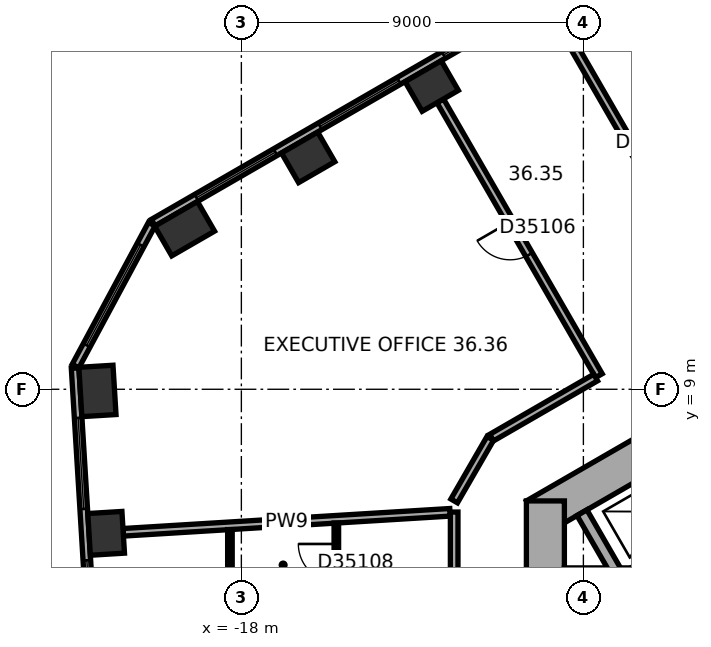
"""IFC4 building model, lengths in metres.
Left out: names, types, materials, properties, quantities, classifications, styles, units other than length and angle.
Written with IfcOpenShell. Run it as: python <this file> out.ifc"""

import sys

from ifc_helpers import new_model, si_unit, direction, frame, frame_2d, origin, origin_2d, place, context, subcontext, project, spatial, rectangle, extrude, element, fill, save


model = new_model("IFC4")
c1 = context("Model", 3, precision=1e-05, world=origin(), true_north=direction((0.0, 1.0)))
c2 = subcontext(c1, "Body", "Model", "MODEL_VIEW")
j1 = project(units=[si_unit("LENGTHUNIT", "METRE"), si_unit("PLANEANGLEUNIT", "RADIAN")], contexts=[c1])
p1 = place(None, origin())
s1 = spatial("IfcSite", under=j1, at=p1, CompositionType="ELEMENT")
p2 = place(p1, origin())
s2 = spatial("IfcBuilding", under=s1, at=p2, CompositionType="ELEMENT")
p3 = place(p2, frame((0.0, 0.0, 150.3)))
s3 = spatial("IfcBuildingStorey", under=s2, at=p3, CompositionType="ELEMENT", Elevation=150.3)
for number, where, z_axis, x_axis in (
    (1, (-12.991, 16.979, 0.0), (0.0, 0.0, 1.0), (-0.866, -0.5, 0.0)),
    (2, (-16.242, 15.102, 0.0), (0.0, 0.0, 1.0), (-0.866, -0.5, 0.0)),
):
    element("IfcColumn", number, at=place(p3, frame(where, z_axis=z_axis, x_axis=x_axis)), inside=s3, PredefinedType="COLUMN", context=c2, shape_type="SweptSolid", body=[
        extrude(rectangle(XDim=1.1, YDim=0.9, at=origin_2d()), origin(), (0.0, 0.0, 1.0), 3.7),
    ])
for number, where, z_axis, x_axis in (
    (3, (-19.494, 13.225, 0.0), (0.0, 0.0, 1.0), (-0.866, -0.5, 0.0)),
    (4, (-21.787, 8.956, 0.0), (0.0, 0.0, 1.0), (0.061, -0.998, 0.0)),
):
    element("IfcColumn", number, at=place(p3, frame(where, z_axis=z_axis, x_axis=x_axis)), inside=s3, PredefinedType="COLUMN", context=c2, shape_type="SweptSolid", body=[
        extrude(rectangle(XDim=1.3, YDim=0.9, at=origin_2d()), origin(), (0.0, 0.0, 1.0), 3.7),
    ])
p4 = place(p3, frame((-21.558, 5.209, 0.0), z_axis=(0.0, 0.0, 1.0), x_axis=(0.061048539535, -0.998134798422, 0.0)))
e5 = element("IfcColumn", 5, at=p4, inside=s3, PredefinedType="COLUMN", context=c2, shape_type="SweptSolid", body=[
    extrude(rectangle(XDim=1.1, YDim=0.9, at=origin_2d()), origin(), (0.0, 0.0, 1.0), 3.7),
])
p5 = place(p3, frame((0.25, 11.691, 0.0), z_axis=(0.0, 0.0, 1.0), x_axis=(-0.866022616891, -0.50000482701, 0.0)))
e6 = element("IfcWall", 6, at=p5, inside=s3, PredefinedType="SHEAR", context=c2, shape_type="SweptSolid", body=[
    extrude(rectangle(XDim=12.125, YDim=1.0, at=frame_2d((6.062, 0.0))), origin(), (0.0, 0.0, 1.0), 3.7),
])
p6 = place(p5, frame((6.262, 0.0, 0.0)))
e7 = element("IfcOpeningElement", 7, at=p6, cuts=e6, PredefinedType="OPENING", context=c2, shape_type="SweptSolid", body=[
    extrude(rectangle(XDim=1.5, YDim=2.1, at=frame_2d((0.75, 1.05))), frame((0.0, 0.51, 0.0), z_axis=(0.0, -1.0, 0.0), x_axis=(1.0, 0.0, 0.0)), (0.0, 0.0, 1.0), 1.02),
])
p7 = place(p5, frame((1.812, 0.0, 0.0)))
e8 = element("IfcOpeningElement", 8, at=p7, cuts=e6, PredefinedType="OPENING", context=c2, shape_type="SweptSolid", body=[
    extrude(rectangle(XDim=0.9, YDim=2.1, at=frame_2d((0.45, 1.05))), frame((0.0, 0.51, 0.0), z_axis=(0.0, -1.0, 0.0), x_axis=(1.0, 0.0, 0.0)), (0.0, 0.0, 1.0), 1.02),
])
p8 = place(p5, frame((4.412, 0.0, 0.0)))
e9 = element("IfcOpeningElement", 9, at=p8, cuts=e6, PredefinedType="OPENING", context=c2, shape_type="SweptSolid", body=[
    extrude(rectangle(XDim=0.9, YDim=2.1, at=frame_2d((0.45, 1.05))), frame((0.0, 0.51, 0.0), z_axis=(0.0, -1.0, 0.0), x_axis=(1.0, 0.0, 0.0)), (0.0, 0.0, 1.0), 1.02),
])
p9 = place(p3, frame((-10.0, 6.062, 0.0), z_axis=(0.0, 0.0, 1.0), x_axis=(0.0, -1.0, 0.0)))
e10 = element("IfcWall", 10, at=p9, inside=s3, PredefinedType="SHEAR", context=c2, shape_type="SweptSolid", body=[
    extrude(rectangle(XDim=12.125, YDim=1.0, at=frame_2d((6.062, 0.0))), origin(), (0.0, 0.0, 1.0), 3.7),
])
p10 = place(p9, frame((5.212, 0.0, 0.0)))
e11 = element("IfcOpeningElement", 11, at=p10, cuts=e10, PredefinedType="OPENING", context=c2, shape_type="SweptSolid", body=[
    extrude(rectangle(XDim=1.1, YDim=2.1, at=frame_2d((0.55, 1.05))), frame((0.0, 0.51, 0.0), z_axis=(0.0, -1.0, 0.0), x_axis=(1.0, 0.0, 0.0)), (0.0, 0.0, 1.0), 1.02),
])
p11 = place(p9, frame((7.812, 0.0, 0.0)))
e12 = element("IfcOpeningElement", 12, at=p11, cuts=e10, PredefinedType="OPENING", context=c2, shape_type="SweptSolid", body=[
    extrude(rectangle(XDim=1.1, YDim=2.1, at=frame_2d((0.55, 1.05))), frame((0.0, 0.51, 0.0), z_axis=(0.0, -1.0, 0.0), x_axis=(1.0, 0.0, 0.0)), (0.0, 0.0, 1.0), 1.02),
])
p12 = place(p3, frame((-2.961, 23.405, 0.0), z_axis=(0.0, 0.0, 1.0), x_axis=(-0.866023315909, -0.500003616288, 0.0)))
e13 = element("IfcWall", 13, at=p12, inside=s3, PredefinedType="STANDARD", context=c2, shape_type="SweptSolid", body=[
    extrude(rectangle(XDim=20.044, YDim=0.2, at=frame_2d((10.022, 0.0))), origin(), (0.0, 0.0, 1.0), 3.7),
])
p13 = place(p12, frame((1.314, 0.0, 0.9)))
e14 = element("IfcOpeningElement", 14, at=p13, cuts=e13, PredefinedType="OPENING", context=c2, shape_type="SweptSolid", body=[
    extrude(rectangle(XDim=2.4, YDim=2.0, at=frame_2d((1.2, 1.0))), frame((0.0, 0.11, 0.0), z_axis=(0.0, -1.0, 0.0), x_axis=(1.0, 0.0, 0.0)), (0.0, 0.0, 1.0), 0.22),
])
p14 = place(p12, frame((5.069, 0.0, 0.9)))
e15 = element("IfcOpeningElement", 15, at=p14, cuts=e13, PredefinedType="OPENING", context=c2, shape_type="SweptSolid", body=[
    extrude(rectangle(XDim=2.4, YDim=2.0, at=frame_2d((1.2, 1.0))), frame((0.0, 0.11, 0.0), z_axis=(0.0, -1.0, 0.0), x_axis=(1.0, 0.0, 0.0)), (0.0, 0.0, 1.0), 0.22),
])
p15 = place(p12, frame((8.823, 0.0, 0.9)))
e16 = element("IfcOpeningElement", 16, at=p15, cuts=e13, PredefinedType="OPENING", context=c2, shape_type="SweptSolid", body=[
    extrude(rectangle(XDim=2.4, YDim=2.0, at=frame_2d((1.2, 1.0))), frame((0.0, 0.11, 0.0), z_axis=(0.0, -1.0, 0.0), x_axis=(1.0, 0.0, 0.0)), (0.0, 0.0, 1.0), 0.22),
])
p16 = place(p12, frame((12.577, 0.0, 0.9)))
e17 = element("IfcOpeningElement", 17, at=p16, cuts=e13, PredefinedType="OPENING", context=c2, shape_type="SweptSolid", body=[
    extrude(rectangle(XDim=2.4, YDim=2.0, at=frame_2d((1.2, 1.0))), frame((0.0, 0.11, 0.0), z_axis=(0.0, -1.0, 0.0), x_axis=(1.0, 0.0, 0.0)), (0.0, 0.0, 1.0), 0.22),
])
p17 = place(p12, frame((16.331, 0.0, 0.9)))
e18 = element("IfcOpeningElement", 18, at=p17, cuts=e13, PredefinedType="OPENING", context=c2, shape_type="SweptSolid", body=[
    extrude(rectangle(XDim=2.4, YDim=2.0, at=frame_2d((1.2, 1.0))), frame((0.0, 0.11, 0.0), z_axis=(0.0, -1.0, 0.0), x_axis=(1.0, 0.0, 0.0)), (0.0, 0.0, 1.0), 0.22),
])
p18 = place(p3, frame((-20.357, 13.344, 0.0), z_axis=(0.0, 0.0, 1.0), x_axis=(-0.473288913494, -0.880907262068, 0.0)))
e19 = element("IfcWall", 19, at=p18, inside=s3, PredefinedType="STANDARD", context=c2, shape_type="SweptSolid", body=[
    extrude(rectangle(XDim=4.238, YDim=0.2, at=frame_2d((2.119, 0.0))), origin(), (0.0, 0.0, 1.0), 3.7),
])
p19 = place(p18, frame((0.619, 0.0, 0.9)))
e20 = element("IfcOpeningElement", 20, at=p19, cuts=e19, PredefinedType="OPENING", context=c2, shape_type="SweptSolid", body=[
    extrude(rectangle(XDim=3.0, YDim=2.0, at=frame_2d((1.5, 1.0))), frame((0.0, 0.11, 0.0), z_axis=(0.0, -1.0, 0.0), x_axis=(1.0, 0.0, 0.0)), (0.0, 0.0, 1.0), 0.22),
])
p20 = place(p3, frame((-22.375, 9.557, 0.0), z_axis=(0.0, 0.0, 1.0), x_axis=(0.061036015339, -0.998135564356, 0.0)))
e21 = element("IfcWall", 21, at=p20, inside=s3, PredefinedType="STANDARD", context=c2, shape_type="SweptSolid", body=[
    extrude(rectangle(XDim=20.044, YDim=0.2, at=frame_2d((10.022, 0.0))), origin(), (0.0, 0.0, 1.0), 3.7),
])
p21 = place(p20, frame((1.313, 0.0, 0.9)))
e22 = element("IfcOpeningElement", 22, at=p21, cuts=e21, PredefinedType="OPENING", context=c2, shape_type="SweptSolid", body=[
    extrude(rectangle(XDim=2.4, YDim=2.0, at=frame_2d((1.2, 1.0))), frame((0.0, 0.11, 0.0), z_axis=(0.0, -1.0, 0.0), x_axis=(1.0, 0.0, 0.0)), (0.0, 0.0, 1.0), 0.22),
])
p22 = place(p20, frame((5.067, 0.0, 0.9)))
e23 = element("IfcOpeningElement", 23, at=p22, cuts=e21, PredefinedType="OPENING", context=c2, shape_type="SweptSolid", body=[
    extrude(rectangle(XDim=2.4, YDim=2.0, at=frame_2d((1.2, 1.0))), frame((0.0, 0.11, 0.0), z_axis=(0.0, -1.0, 0.0), x_axis=(1.0, 0.0, 0.0)), (0.0, 0.0, 1.0), 0.22),
])
p23 = place(p20, frame((8.821, 0.0, 0.9)))
e24 = element("IfcOpeningElement", 24, at=p23, cuts=e21, PredefinedType="OPENING", context=c2, shape_type="SweptSolid", body=[
    extrude(rectangle(XDim=2.4, YDim=2.0, at=frame_2d((1.2, 1.0))), frame((0.0, 0.11, 0.0), z_axis=(0.0, -1.0, 0.0), x_axis=(1.0, 0.0, 0.0)), (0.0, 0.0, 1.0), 0.22),
])
p24 = place(p20, frame((12.575, 0.0, 0.9)))
e25 = element("IfcOpeningElement", 25, at=p24, cuts=e21, PredefinedType="OPENING", context=c2, shape_type="SweptSolid", body=[
    extrude(rectangle(XDim=2.4, YDim=2.0, at=frame_2d((1.2, 1.0))), frame((0.0, 0.11, 0.0), z_axis=(0.0, -1.0, 0.0), x_axis=(1.0, 0.0, 0.0)), (0.0, 0.0, 1.0), 0.22),
])
p25 = place(p20, frame((16.329, 0.0, 0.9)))
e26 = element("IfcOpeningElement", 26, at=p25, cuts=e21, PredefinedType="OPENING", context=c2, shape_type="SweptSolid", body=[
    extrude(rectangle(XDim=2.4, YDim=2.0, at=frame_2d((1.2, 1.0))), frame((0.0, 0.11, 0.0), z_axis=(0.0, -1.0, 0.0), x_axis=(1.0, 0.0, 0.0)), (0.0, 0.0, 1.0), 0.22),
])
p26 = place(p3, frame((-5.24, 5.577, 0.0), z_axis=(0.0, 0.0, 1.0), x_axis=(-0.866014461049, -0.500018952895, 0.0)))
e27 = element("IfcWall", 27, at=p26, inside=s3, PredefinedType="SHEAR", context=c2, shape_type="SweptSolid", body=[
    extrude(rectangle(XDim=3.35, YDim=0.3, at=frame_2d((1.675, 0.0))), origin(), (0.0, 0.0, 1.0), 3.42),
])
p27 = place(p3, frame((-7.937, 3.847, 0.0), z_axis=(0.0, 0.0, 1.0), x_axis=(-0.50002983664, 0.866008176907, 0.0)))
e28 = element("IfcWall", 28, at=p27, inside=s3, PredefinedType="SHEAR", context=c2, shape_type="SweptSolid", body=[
    extrude(rectangle(XDim=2.2, YDim=0.3, at=frame_2d((1.1, 0.0))), origin(), (0.0, 0.0, 1.0), 3.42),
])
p28 = place(p3, frame((-21.109, 5.237, 0.0), z_axis=(0.0, 0.0, 1.0), x_axis=(0.998135264293, 0.061040922131, 0.0)))
e29 = element("IfcWall", 29, at=p28, inside=s3, PredefinedType="PARTITIONING", context=c2, shape_type="SweptSolid", body=[
    extrude(rectangle(XDim=8.615, YDim=0.2, at=frame_2d((4.308, 0.0))), origin(), (0.0, 0.0, 1.0), 3.42),
])
p29 = place(p3, frame((-18.301, 5.308, 0.0), z_axis=(0.0, 0.0, 1.0), x_axis=(0.0, -1.0, 0.0)))
e30 = element("IfcWall", 30, at=p29, inside=s3, PredefinedType="PARTITIONING", context=c2, shape_type="SweptSolid", body=[
    extrude(rectangle(XDim=1.869, YDim=0.12, at=frame_2d((0.934, 0.0))), origin(), (0.0, 0.0, 1.0), 3.42),
])
p30 = place(p3, frame((-15.501, 5.479, 0.0), z_axis=(0.0, 0.0, 1.0), x_axis=(0.0, -1.0, 0.0)))
e31 = element("IfcWall", 31, at=p30, inside=s3, PredefinedType="PARTITIONING", context=c2, shape_type="SweptSolid", body=[
    extrude(rectangle(XDim=11.083, YDim=0.12, at=frame_2d((5.542, 0.0))), origin(), (0.0, 0.0, 1.0), 3.42),
])
p31 = place(p30, frame((0.55, 0.0, 0.0)))
e32 = element("IfcOpeningElement", 32, at=p31, cuts=e31, PredefinedType="OPENING", context=c2, shape_type="SweptSolid", body=[
    extrude(rectangle(XDim=1.0, YDim=2.1, at=frame_2d((0.5, 1.05))), frame((0.0, 0.07, 0.0), z_axis=(0.0, -1.0, 0.0), x_axis=(1.0, 0.0, 0.0)), (0.0, 0.0, 1.0), 0.14),
])
p32 = place(p30, frame((3.636, 0.0, 0.0)))
e33 = element("IfcOpeningElement", 33, at=p32, cuts=e31, PredefinedType="OPENING", context=c2, shape_type="SweptSolid", body=[
    extrude(rectangle(XDim=0.9, YDim=2.1, at=frame_2d((0.45, 1.05))), frame((0.0, 0.07, 0.0), z_axis=(0.0, -1.0, 0.0), x_axis=(1.0, 0.0, 0.0)), (0.0, 0.0, 1.0), 0.14),
])
p33 = place(p30, frame((8.127, 0.0, 0.0)))
e34 = element("IfcOpeningElement", 34, at=p33, cuts=e31, PredefinedType="OPENING", context=c2, shape_type="SweptSolid", body=[
    extrude(rectangle(XDim=0.9, YDim=2.1, at=frame_2d((0.45, 1.05))), frame((0.0, 0.07, 0.0), z_axis=(0.0, -1.0, 0.0), x_axis=(1.0, 0.0, 0.0)), (0.0, 0.0, 1.0), 0.14),
])
p34 = place(p3, frame((-12.766, 16.589, 0.0), z_axis=(0.0, 0.0, 1.0), x_axis=(0.500010139422, -0.866019549707, 0.0)))
e35 = element("IfcWall", 35, at=p34, inside=s3, PredefinedType="PARTITIONING", context=c2, shape_type="SweptSolid", body=[
    extrude(rectangle(XDim=8.35, YDim=0.2, at=frame_2d((4.175, 0.0))), origin(), (0.0, 0.0, 1.0), 3.42),
])
p35 = place(p34, frame((3.675, 0.0, 0.0)))
e36 = element("IfcOpeningElement", 36, at=p35, cuts=e35, PredefinedType="OPENING", context=c2, shape_type="SweptSolid", body=[
    extrude(rectangle(XDim=1.0, YDim=2.1, at=frame_2d((0.5, 1.05))), frame((0.0, 0.11, 0.0), z_axis=(0.0, -1.0, 0.0), x_axis=(1.0, 0.0, 0.0)), (0.0, 0.0, 1.0), 0.22),
])
p36 = place(p3, frame((-12.4, 5.769, 0.0), z_axis=(0.0, 0.0, 1.0), x_axis=(0.0, -1.0, 0.0)))
e37 = element("IfcWall", 37, at=p36, inside=s3, PredefinedType="PARTITIONING", context=c2, shape_type="SweptSolid", body=[
    extrude(rectangle(XDim=3.568, YDim=0.2, at=frame_2d((1.784, 0.0))), origin(), (0.0, 0.0, 1.0), 3.42),
])
p37 = place(p3, frame((-11.45, 7.708, 0.0), z_axis=(0.0, 0.0, 1.0), x_axis=(-0.500022797313, -0.86601224135, 0.0)))
e38 = element("IfcWall", 38, at=p37, inside=s3, PredefinedType="PARTITIONING", context=c2, shape_type="SweptSolid", body=[
    extrude(rectangle(XDim=1.9, YDim=0.2, at=frame_2d((0.95, 0.0))), origin(), (0.0, 0.0, 1.0), 3.42),
])
p38 = place(p3, frame((-9.515, 18.466, 0.0), z_axis=(0.0, 0.0, 1.0), x_axis=(0.500010139422, -0.866019549707, 0.0)))
e39 = element("IfcWall", 39, at=p38, inside=s3, PredefinedType="PARTITIONING", context=c2, shape_type="SweptSolid", body=[
    extrude(rectangle(XDim=8.35, YDim=0.2, at=frame_2d((4.175, 0.0))), origin(), (0.0, 0.0, 1.0), 2.87),
])
p39 = place(p38, frame((3.275, 0.0, 0.0)))
e40 = element("IfcOpeningElement", 40, at=p39, cuts=e39, PredefinedType="OPENING", context=c2, shape_type="SweptSolid", body=[
    extrude(rectangle(XDim=1.0, YDim=2.1, at=frame_2d((0.5, 1.05))), frame((0.0, 0.11, 0.0), z_axis=(0.0, -1.0, 0.0), x_axis=(1.0, 0.0, 0.0)), (0.0, 0.0, 1.0), 0.22),
])
p40 = place(p3, frame((-8.678, 9.308, 0.0), z_axis=(0.0, 0.0, 1.0), x_axis=(-0.866000359435, -0.500043375578, 0.0)))
e41 = element("IfcWall", 41, at=p40, inside=s3, PredefinedType="PARTITIONING", context=c2, shape_type="SweptSolid", body=[
    extrude(rectangle(XDim=3.161, YDim=0.2, at=frame_2d((1.581, 0.0))), origin(), (0.0, 0.0, 1.0), 3.42),
])
p41 = place(p15, origin())
e42 = element("IfcWindow", 42, at=p41, inside=s3, PartitioningType="SINGLE_PANEL", PredefinedType="WINDOW", context=c2, shape_type="SweptSolid", body=[
    extrude(rectangle(XDim=2.4, YDim=2.0, at=frame_2d((1.2, 1.0))), frame((0.0, 0.03, 0.0), z_axis=(0.0, -1.0, 0.0), x_axis=(1.0, 0.0, 0.0)), (0.0, 0.0, 1.0), 0.06),
])
fill(e16, e42)
p42 = place(p16, origin())
e43 = element("IfcWindow", 43, at=p42, inside=s3, PartitioningType="SINGLE_PANEL", PredefinedType="WINDOW", context=c2, shape_type="SweptSolid", body=[
    extrude(rectangle(XDim=2.4, YDim=2.0, at=frame_2d((1.2, 1.0))), frame((0.0, 0.03, 0.0), z_axis=(0.0, -1.0, 0.0), x_axis=(1.0, 0.0, 0.0)), (0.0, 0.0, 1.0), 0.06),
])
fill(e17, e43)
p43 = place(p17, origin())
e44 = element("IfcWindow", 44, at=p43, inside=s3, PartitioningType="SINGLE_PANEL", PredefinedType="WINDOW", context=c2, shape_type="SweptSolid", body=[
    extrude(rectangle(XDim=2.4, YDim=2.0, at=frame_2d((1.2, 1.0))), frame((0.0, 0.03, 0.0), z_axis=(0.0, -1.0, 0.0), x_axis=(1.0, 0.0, 0.0)), (0.0, 0.0, 1.0), 0.06),
])
fill(e18, e44)
p44 = place(p19, origin())
e45 = element("IfcWindow", 45, at=p44, inside=s3, PartitioningType="SINGLE_PANEL", PredefinedType="WINDOW", context=c2, shape_type="SweptSolid", body=[
    extrude(rectangle(XDim=3.0, YDim=2.0, at=frame_2d((1.5, 1.0))), frame((0.0, 0.03, 0.0), z_axis=(0.0, -1.0, 0.0), x_axis=(1.0, 0.0, 0.0)), (0.0, 0.0, 1.0), 0.06),
])
fill(e20, e45)
p45 = place(p21, origin())
e46 = element("IfcWindow", 46, at=p45, inside=s3, PartitioningType="SINGLE_PANEL", PredefinedType="WINDOW", context=c2, shape_type="SweptSolid", body=[
    extrude(rectangle(XDim=2.4, YDim=2.0, at=frame_2d((1.2, 1.0))), frame((0.0, 0.03, 0.0), z_axis=(0.0, -1.0, 0.0), x_axis=(1.0, 0.0, 0.0)), (0.0, 0.0, 1.0), 0.06),
])
fill(e22, e46)
p46 = place(p22, origin())
e47 = element("IfcWindow", 47, at=p46, inside=s3, PartitioningType="SINGLE_PANEL", PredefinedType="WINDOW", context=c2, shape_type="SweptSolid", body=[
    extrude(rectangle(XDim=2.4, YDim=2.0, at=frame_2d((1.2, 1.0))), frame((0.0, 0.03, 0.0), z_axis=(0.0, -1.0, 0.0), x_axis=(1.0, 0.0, 0.0)), (0.0, 0.0, 1.0), 0.06),
])
fill(e23, e47)
p47 = place(p39, origin())
e48 = element("IfcDoor", 48, at=p47, inside=s3, OperationType="SINGLE_SWING_LEFT", PredefinedType="DOOR", context=c2, shape_type="SweptSolid", body=[
    extrude(rectangle(XDim=1.0, YDim=2.1, at=frame_2d((0.5, 1.05))), frame((0.0, 0.025, 0.0), z_axis=(0.0, -1.0, 0.0), x_axis=(1.0, 0.0, 0.0)), (0.0, 0.0, 1.0), 0.05),
])
fill(e40, e48)
p48 = place(p35, origin())
e49 = element("IfcDoor", 49, at=p48, inside=s3, OperationType="SINGLE_SWING_LEFT", PredefinedType="DOOR", context=c2, shape_type="SweptSolid", body=[
    extrude(rectangle(XDim=1.0, YDim=2.1, at=frame_2d((0.5, 1.05))), frame((0.0, 0.025, 0.0), z_axis=(0.0, -1.0, 0.0), x_axis=(1.0, 0.0, 0.0)), (0.0, 0.0, 1.0), 0.05),
])
fill(e36, e49)
p49 = place(p31, origin())
e50 = element("IfcDoor", 50, at=p49, inside=s3, OperationType="SINGLE_SWING_LEFT", PredefinedType="DOOR", context=c2, shape_type="SweptSolid", body=[
    extrude(rectangle(XDim=1.0, YDim=2.1, at=frame_2d((0.5, 1.05))), frame((0.0, 0.025, 0.0), z_axis=(0.0, -1.0, 0.0), x_axis=(1.0, 0.0, 0.0)), (0.0, 0.0, 1.0), 0.05),
])
fill(e32, e50)
save(model, sys.argv[1])
